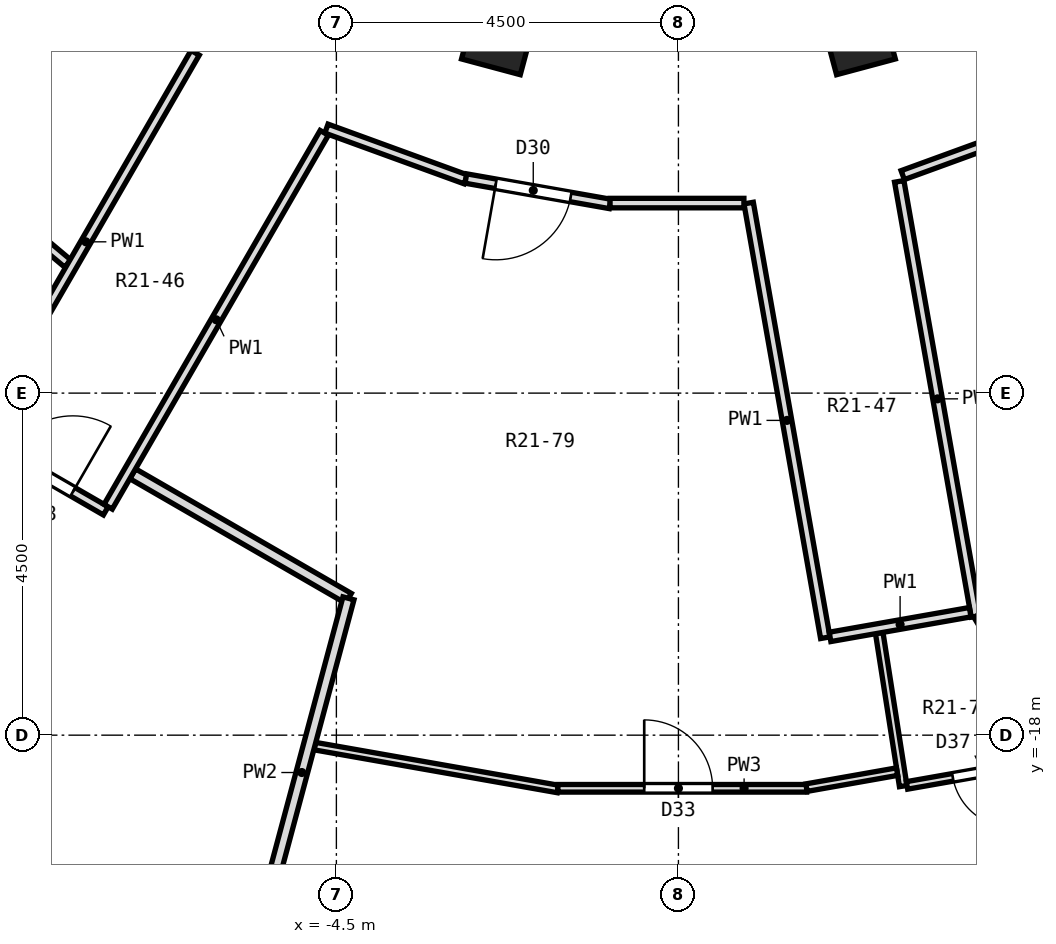
"""IFC4 building model, lengths in metres.
Left out: names, types, materials, properties, quantities, classifications, styles, units other than length and angle.
Written with IfcOpenShell. Run it as: python <this file> out.ifc"""

import sys

from ifc_helpers import new_model, si_unit, direction, frame, frame_2d, origin, origin_2d, place, context, subcontext, project, spatial, rectangle, extrude, element, fill, save


model = new_model("IFC4")
c1 = context("Model", 3, precision=1e-05, world=origin(), true_north=direction((0.0, 1.0)))
c2 = subcontext(c1, "Body", "Model", "MODEL_VIEW")
j1 = project(units=[si_unit("LENGTHUNIT", "METRE"), si_unit("PLANEANGLEUNIT", "RADIAN")], contexts=[c1])
p1 = place(None, origin())
s1 = spatial("IfcSite", under=j1, at=p1, CompositionType="ELEMENT")
p2 = place(p1, origin())
s2 = spatial("IfcBuilding", under=s1, at=p2, CompositionType="ELEMENT")
p3 = place(p2, frame((0.0, 0.0, 131.5)))
s3 = spatial("IfcBuildingStorey", under=s2, at=p3, CompositionType="ELEMENT", Elevation=131.5)
for number, where, z_axis, x_axis in (
    (1, (-2.364, -8.821, 0.0), (0.0, 0.0, 1.0), (-0.259, -0.966, 0.0)),
    (2, (2.364, -8.821, 0.0), (0.0, 0.0, 1.0), (0.259, -0.966, 0.0)),
):
    element("IfcColumn", number, at=place(p3, frame(where, z_axis=z_axis, x_axis=x_axis)), inside=s3, PredefinedType="COLUMN", context=c2, shape_type="SweptSolid", body=[
        extrude(rectangle(XDim=0.8, YDim=0.8, at=origin_2d()), origin(), (0.0, 0.0, 1.0), 3.3),
    ])
p4 = place(p3, frame((2.642, -16.656, 0.0), z_axis=(0.0, 0.0, 1.0), x_axis=(0.154658266248, -0.987968026143, 0.0)))
e3 = element("IfcWall", 3, at=p4, inside=s3, PredefinedType="PARTITIONING", context=c2, shape_type="SweptSolid", body=[
    extrude(rectangle(XDim=2.038, YDim=0.1, at=frame_2d((1.019, 0.0))), origin(), (0.0, 0.0, 1.0), 2.8),
])
p5 = place(p3, frame((0.924, -11.0, 0.0), z_axis=(0.0, 0.0, 1.0), x_axis=(0.173576639114, -0.98482036451, 0.0)))
e4 = element("IfcWall", 4, at=p5, inside=s3, PredefinedType="PARTITIONING", context=c2, shape_type="SweptSolid", body=[
    extrude(rectangle(XDim=5.806, YDim=0.125, at=frame_2d((2.903, 0.0))), origin(), (0.0, 0.0, 1.0), 2.8),
])
p6 = place(p3, frame((2.905, -10.715, 0.0), z_axis=(0.0, 0.0, 1.0), x_axis=(0.173617542192, -0.984813154382, 0.0)))
e5 = element("IfcWall", 5, at=p6, inside=s3, PredefinedType="PARTITIONING", context=c2, shape_type="SweptSolid", body=[
    extrude(rectangle(XDim=5.81, YDim=0.125, at=frame_2d((2.905, 0.0))), origin(), (0.0, 0.0, 1.0), 2.8),
])
p7 = place(p3, frame((3.932, -16.426, 0.0), z_axis=(0.0, 0.0, 1.0), x_axis=(0.511292595627, -0.859406703288, 0.0)))
e6 = element("IfcWall", 6, at=p7, inside=s3, PredefinedType="PARTITIONING", context=c2, shape_type="SweptSolid", body=[
    extrude(rectangle(XDim=2.132, YDim=0.1, at=frame_2d((1.066, 0.0))), origin(), (0.0, 0.0, 1.0), 2.8),
])
p8 = place(p3, frame((-10.079, -10.079, 0.0), z_axis=(0.0, 0.0, 1.0), x_axis=(0.766028909875, -0.642806121031, 0.0)))
e7 = element("IfcWall", 7, at=p8, inside=s3, PredefinedType="PARTITIONING", context=c2, shape_type="SweptSolid", body=[
    extrude(rectangle(XDim=2.671, YDim=0.125, at=frame_2d((1.335, 0.0))), origin(), (0.0, 0.0, 1.0), 2.8),
])
p9 = place(p3, frame((-9.264, -14.05, 0.0), z_axis=(0.0, 0.0, 1.0), x_axis=(0.866008543052, -0.500029202507, 0.0)))
e8 = element("IfcWall", 8, at=p9, inside=s3, PredefinedType="PARTITIONING", context=c2, shape_type="SweptSolid", body=[
    extrude(rectangle(XDim=1.998, YDim=0.125, at=frame_2d((0.999, 0.0))), origin(), (0.0, 0.0, 1.0), 2.8),
])
p10 = place(p9, frame((0.498, 0.0, 0.0)))
e9 = element("IfcOpeningElement", 9, at=p10, cuts=e8, PredefinedType="OPENING", context=c2, shape_type="SweptSolid", body=[
    extrude(rectangle(XDim=1.0, YDim=2.1, at=frame_2d((0.5, 1.05))), frame((0.0, 0.074, 0.0), z_axis=(0.0, -1.0, 0.0), x_axis=(1.0, 0.0, 0.0)), (0.0, 0.0, 1.0), 0.149),
])
p11 = place(p3, frame((-7.18, -14.561, 0.0), z_axis=(0.0, 0.0, 1.0), x_axis=(0.866071485186, -0.499920176176, 0.0)))
e10 = element("IfcWall", 10, at=p11, inside=s3, PredefinedType="PARTITIONING", context=c2, shape_type="SweptSolid", body=[
    extrude(rectangle(XDim=3.278, YDim=0.15, at=frame_2d((1.639, 0.0))), origin(), (0.0, 0.0, 1.0), 2.8),
])
p12 = place(p3, frame((-4.631, -10.02, 0.0), z_axis=(0.0, 0.0, 1.0), x_axis=(0.939584951486, -0.342315817545, 0.0)))
e11 = element("IfcWall", 11, at=p12, inside=s3, PredefinedType="PARTITIONING", context=c2, shape_type="SweptSolid", body=[
    extrude(rectangle(XDim=1.951, YDim=0.125, at=frame_2d((0.975, 0.0))), origin(), (0.0, 0.0, 1.0), 2.8),
])
p13 = place(p3, frame((-4.784, -18.144, 0.0), z_axis=(0.0, 0.0, 1.0), x_axis=(0.98481910853, -0.173583765007, 0.0)))
e12 = element("IfcWall", 12, at=p13, inside=s3, PredefinedType="PARTITIONING", context=c2, shape_type="SweptSolid", body=[
    extrude(rectangle(XDim=3.248, YDim=0.1, at=frame_2d((1.624, 0.0))), origin(), (0.0, 0.0, 1.0), 2.8),
])
p14 = place(p3, frame((-2.796, -10.677, 0.0), z_axis=(0.0, 0.0, 1.0), x_axis=(0.984830733923, -0.173517795977, 0.0)))
e13 = element("IfcWall", 13, at=p14, inside=s3, PredefinedType="PARTITIONING", context=c2, shape_type="SweptSolid", body=[
    extrude(rectangle(XDim=1.926, YDim=0.125, at=frame_2d((0.963, 0.0))), origin(), (0.0, 0.0, 1.0), 2.8),
])
p15 = place(p14, frame((0.4, 0.0, 0.0)))
e14 = element("IfcOpeningElement", 14, at=p15, cuts=e13, PredefinedType="OPENING", context=c2, shape_type="SweptSolid", body=[
    extrude(rectangle(XDim=1.0, YDim=2.1, at=frame_2d((0.5, 1.05))), frame((0.0, 0.074, 0.0), z_axis=(0.0, -1.0, 0.0), x_axis=(1.0, 0.0, 0.0)), (0.0, 0.0, 1.0), 0.149),
])
p16 = place(p3, frame((-1.586, -18.699, 0.0), z_axis=(0.0, 0.0, 1.0), x_axis=(1.0, 0.0, 0.0)))
e15 = element("IfcWall", 15, at=p16, inside=s3, PredefinedType="PARTITIONING", context=c2, shape_type="SweptSolid", body=[
    extrude(rectangle(XDim=3.273, YDim=0.1, at=frame_2d((1.636, 0.0))), origin(), (0.0, 0.0, 1.0), 2.8),
])
p17 = place(p16, frame((1.136, 0.0, 0.0)))
e16 = element("IfcOpeningElement", 16, at=p17, cuts=e15, PredefinedType="OPENING", context=c2, shape_type="SweptSolid", body=[
    extrude(rectangle(XDim=0.9, YDim=2.1, at=frame_2d((0.45, 1.05))), frame((0.0, 0.062, 0.0), z_axis=(0.0, -1.0, 0.0), x_axis=(1.0, 0.0, 0.0)), (0.0, 0.0, 1.0), 0.124),
])
p18 = place(p3, frame((-0.899, -11.0, 0.0), z_axis=(0.0, 0.0, 1.0), x_axis=(1.0, 0.0, 0.0)))
e17 = element("IfcWall", 17, at=p18, inside=s3, PredefinedType="PARTITIONING", context=c2, shape_type="SweptSolid", body=[
    extrude(rectangle(XDim=1.761, YDim=0.125, at=frame_2d((0.88, 0.0))), origin(), (0.0, 0.0, 1.0), 2.8),
])
p19 = place(p3, frame((3.007, -18.661, 0.0), z_axis=(0.0, 0.0, 1.0), x_axis=(0.984806648716, 0.173654440325, 0.0)))
e18 = element("IfcWall", 18, at=p19, inside=s3, PredefinedType="PARTITIONING", context=c2, shape_type="SweptSolid", body=[
    extrude(rectangle(XDim=2.022, YDim=0.1, at=frame_2d((1.011, 0.0))), origin(), (0.0, 0.0, 1.0), 2.8),
])
p20 = place(p19, frame((0.612, 0.0, 0.0)))
e19 = element("IfcOpeningElement", 19, at=p20, cuts=e18, PredefinedType="OPENING", context=c2, shape_type="SweptSolid", body=[
    extrude(rectangle(XDim=0.8, YDim=2.1, at=frame_2d((0.4, 1.05))), frame((0.0, 0.062, 0.0), z_axis=(0.0, -1.0, 0.0), x_axis=(1.0, 0.0, 0.0)), (0.0, 0.0, 1.0), 0.124),
])
p21 = place(p3, frame((1.685, -18.69, 0.0), z_axis=(0.0, 0.0, 1.0), x_axis=(0.984742886049, 0.17401565555, 0.0)))
e20 = element("IfcWall", 20, at=p21, inside=s3, PredefinedType="PARTITIONING", context=c2, shape_type="SweptSolid", body=[
    extrude(rectangle(XDim=1.209, YDim=0.1, at=frame_2d((0.605, 0.0))), origin(), (0.0, 0.0, 1.0), 2.8),
])
p22 = place(p3, frame((1.995, -16.707, 0.0), z_axis=(0.0, 0.0, 1.0), x_axis=(0.984821606563, 0.173569591941, 0.0)))
e21 = element("IfcWall", 21, at=p22, inside=s3, PredefinedType="PARTITIONING", context=c2, shape_type="SweptSolid", body=[
    extrude(rectangle(XDim=1.872, YDim=0.125, at=frame_2d((0.936, 0.0))), origin(), (0.0, 0.0, 1.0), 2.8),
])
p23 = place(p3, frame((2.951, -10.632, 0.0), z_axis=(0.0, 0.0, 1.0), x_axis=(0.939616011167, 0.342230553222, 0.0)))
e22 = element("IfcWall", 22, at=p23, inside=s3, PredefinedType="PARTITIONING", context=c2, shape_type="SweptSolid", body=[
    extrude(rectangle(XDim=1.89, YDim=0.125, at=frame_2d((0.945, 0.0))), origin(), (0.0, 0.0, 1.0), 2.8),
])
p24 = place(p3, frame((-7.503, -14.995, 0.0), z_axis=(0.0, 0.0, 1.0), x_axis=(0.500436522094, 0.865773230907, 0.0)))
e23 = element("IfcWall", 23, at=p24, inside=s3, PredefinedType="PARTITIONING", context=c2, shape_type="SweptSolid", body=[
    extrude(rectangle(XDim=5.682, YDim=0.125, at=frame_2d((2.841, 0.0))), origin(), (0.0, 0.0, 1.0), 2.8),
])
p25 = place(p3, frame((-9.233, -13.996, 0.0), z_axis=(0.0, 0.0, 1.0), x_axis=(0.500439738106, 0.865771371971, 0.0)))
e24 = element("IfcWall", 24, at=p25, inside=s3, PredefinedType="PARTITIONING", context=c2, shape_type="SweptSolid", body=[
    extrude(rectangle(XDim=5.744, YDim=0.125, at=frame_2d((2.872, 0.0))), origin(), (0.0, 0.0, 1.0), 2.8),
])
p26 = place(p3, frame((-5.569, -20.784, 0.0), z_axis=(0.0, 0.0, 1.0), x_axis=(0.258735228002, 0.965948281116, 0.0)))
e25 = element("IfcWall", 25, at=p26, inside=s3, PredefinedType="PARTITIONING", context=c2, shape_type="SweptSolid", body=[
    extrude(rectangle(XDim=4.745, YDim=0.15, at=frame_2d((2.373, 0.0))), origin(), (0.0, 0.0, 1.0), 2.8),
])
p27 = place(p10, origin())
e26 = element("IfcDoor", 26, at=p27, inside=s3, OperationType="SINGLE_SWING_RIGHT", PredefinedType="DOOR", context=c2, shape_type="SweptSolid", body=[
    extrude(rectangle(XDim=1.0, YDim=2.1, at=frame_2d((0.5, 1.05))), frame((0.0, 0.025, 0.0), z_axis=(0.0, -1.0, 0.0), x_axis=(1.0, 0.0, 0.0)), (0.0, 0.0, 1.0), 0.05),
])
fill(e9, e26)
p28 = place(p15, frame((1.0, 0.0, 0.0), z_axis=(0.0, 0.0, 1.0), x_axis=(-1.0, 0.0, 0.0)))
e27 = element("IfcDoor", 27, at=p28, inside=s3, OperationType="SINGLE_SWING_RIGHT", PredefinedType="DOOR", context=c2, shape_type="SweptSolid", body=[
    extrude(rectangle(XDim=1.0, YDim=2.1, at=frame_2d((0.5, 1.05))), frame((0.0, 0.025, 0.0), z_axis=(0.0, -1.0, 0.0), x_axis=(1.0, 0.0, 0.0)), (0.0, 0.0, 1.0), 0.05),
])
fill(e14, e27)
p29 = place(p17, origin())
e28 = element("IfcDoor", 28, at=p29, inside=s3, OperationType="SINGLE_SWING_LEFT", PredefinedType="DOOR", context=c2, shape_type="SweptSolid", body=[
    extrude(rectangle(XDim=0.9, YDim=2.1, at=frame_2d((0.45, 1.05))), frame((0.0, 0.025, 0.0), z_axis=(0.0, -1.0, 0.0), x_axis=(1.0, 0.0, 0.0)), (0.0, 0.0, 1.0), 0.05),
])
fill(e16, e28)
p30 = place(p20, frame((0.8, 0.0, 0.0), z_axis=(0.0, 0.0, 1.0), x_axis=(-1.0, 0.0, 0.0)))
e29 = element("IfcDoor", 29, at=p30, inside=s3, OperationType="SINGLE_SWING_LEFT", PredefinedType="DOOR", context=c2, shape_type="SweptSolid", body=[
    extrude(rectangle(XDim=0.8, YDim=2.1, at=frame_2d((0.4, 1.05))), frame((0.0, 0.025, 0.0), z_axis=(0.0, -1.0, 0.0), x_axis=(1.0, 0.0, 0.0)), (0.0, 0.0, 1.0), 0.05),
])
fill(e19, e29)
save(model, sys.argv[1])
